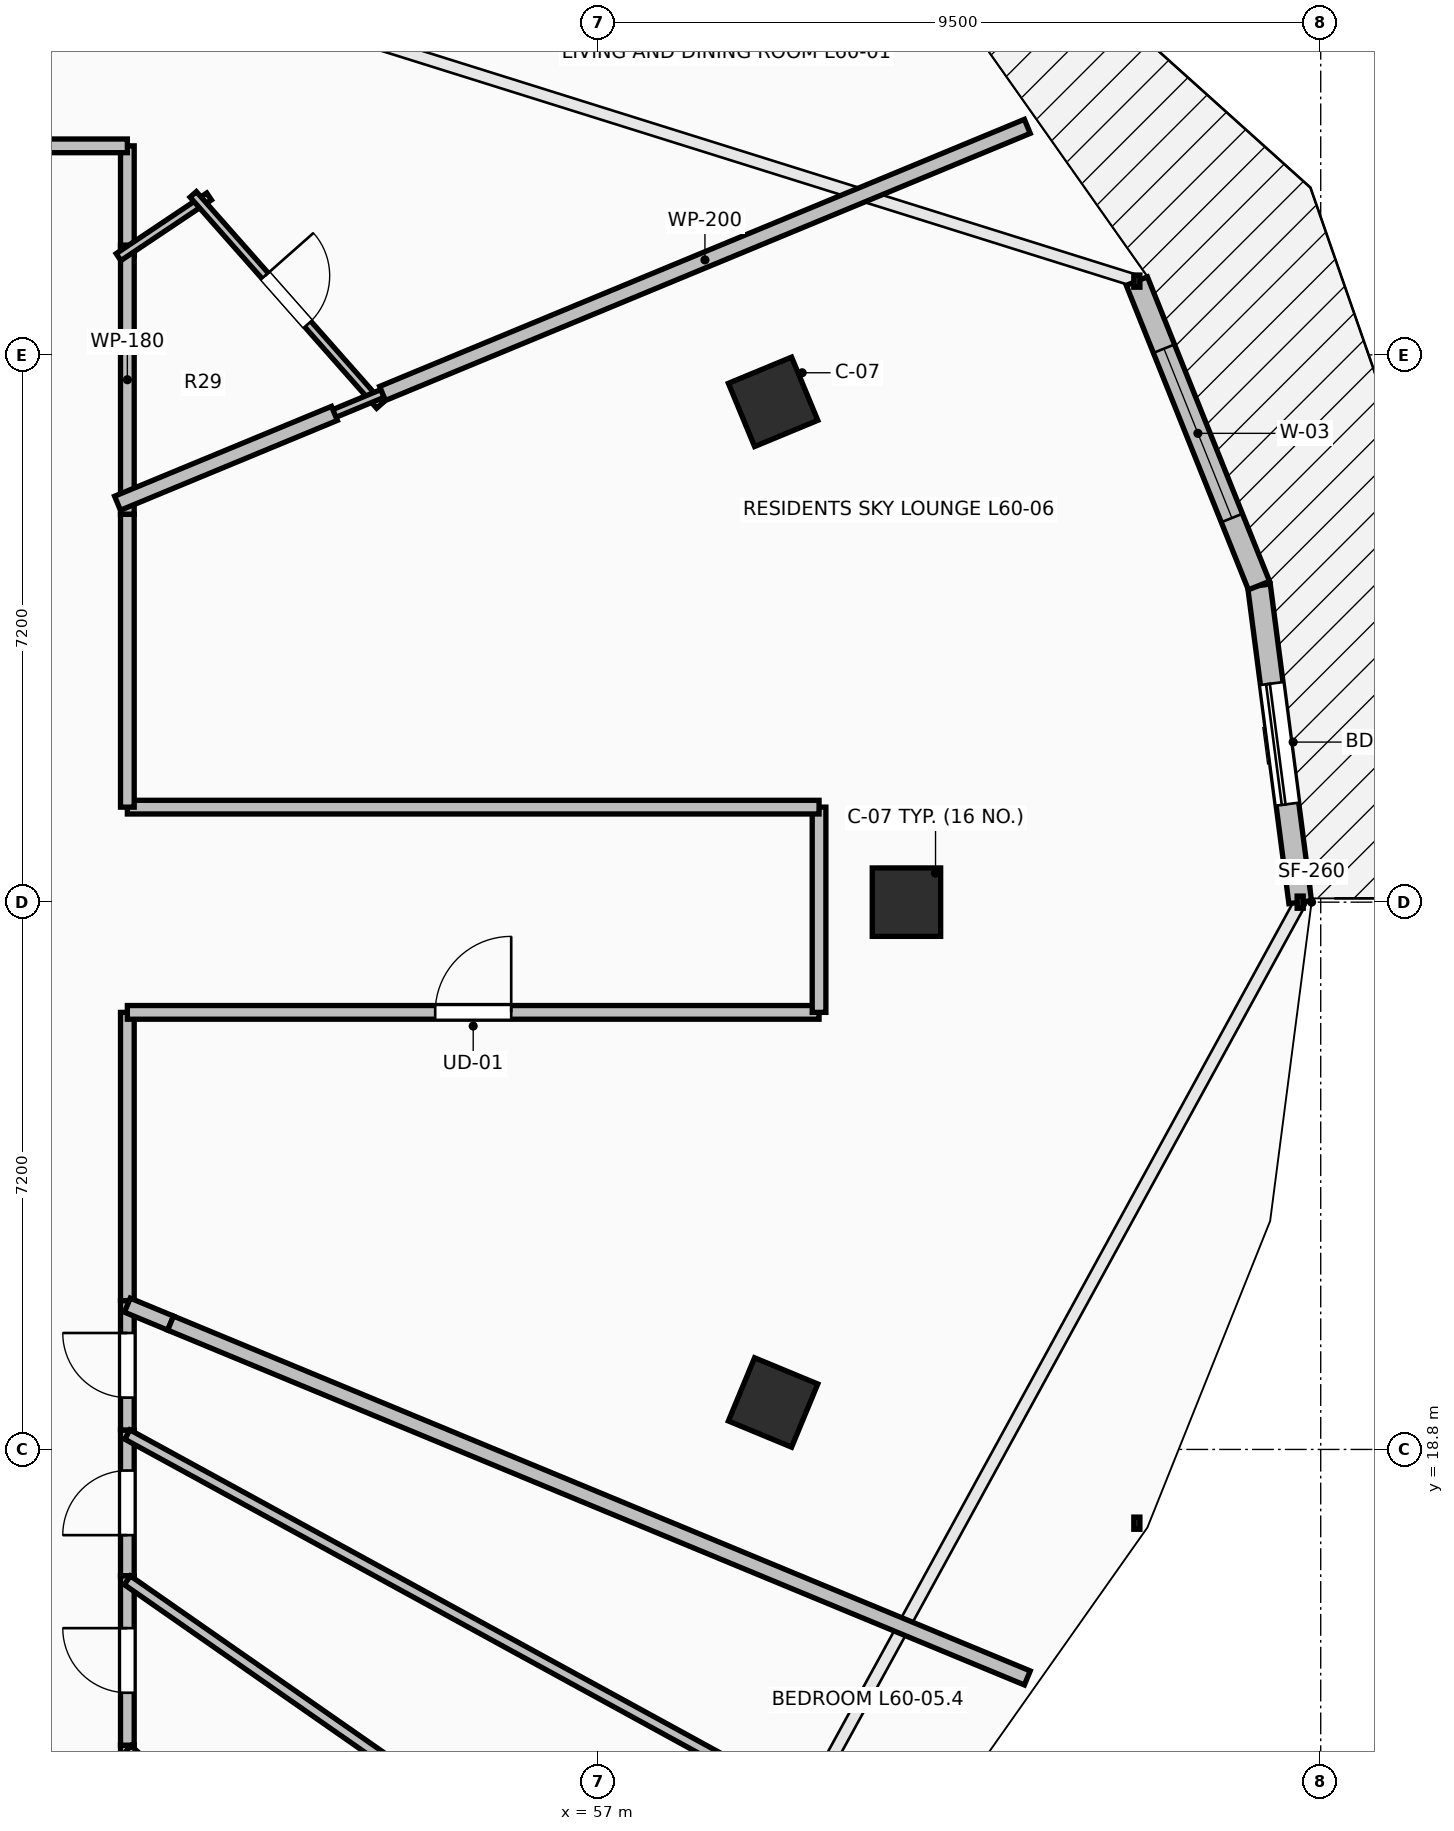
"""IFC4 building model, lengths in metres.
Left out: names, types, materials, properties, quantities, classifications, styles, units other than length and angle.
Written with IfcOpenShell. Run it as: python <this file> out.ifc"""

import sys

from ifc_helpers import new_model, si_unit, direction, frame, frame_2d, origin, origin_2d, place, context, subcontext, project, spatial, rectangle, extrude, element, fill, save


model = new_model("IFC4")
c1 = context("Model", 3, precision=1e-05, world=origin(), true_north=direction((0.0, 1.0)))
c2 = subcontext(c1, "Body", "Model", "MODEL_VIEW")
j1 = project(units=[si_unit("LENGTHUNIT", "METRE"), si_unit("PLANEANGLEUNIT", "RADIAN")], contexts=[c1])
p1 = place(None, origin())
s1 = spatial("IfcSite", under=j1, at=p1, CompositionType="ELEMENT")
p2 = place(p1, origin())
s2 = spatial("IfcBuilding", under=s1, at=p2, CompositionType="ELEMENT")
p3 = place(p2, frame((0.0, 0.0, 221.4)))
s3 = spatial("IfcBuildingStorey", under=s2, at=p3, CompositionType="ELEMENT", Elevation=221.4)
for number, where, z_axis, x_axis in (
    (1, (61.05, 26.0, 0.0), (0.0, 0.0, 1.0), (1.0, 0.0, 0.0)),
    (2, (59.295, 32.582, 0.0), (0.0, 0.0, 1.0), (0.924, 0.383, 0.0)),
    (3, (59.295, 19.418, 0.0), (0.0, 0.0, 1.0), (0.924, -0.383, 0.0)),
):
    element("IfcColumn", number, at=place(p3, frame(where, z_axis=z_axis, x_axis=x_axis)), inside=s3, PredefinedType="COLUMN", context=c2, shape_type="SweptSolid", body=[
        extrude(rectangle(XDim=0.9, YDim=0.9, at=origin_2d()), origin(), (0.0, 0.0, 1.0), 3.55),
    ])
p4 = place(p3, frame((66.23, 26.0, 0.0), z_axis=(0.0, 0.0, 1.0), x_axis=(-0.129147853268, 0.991625348605, 0.0)))
e4 = element("IfcWall", 4, at=p4, inside=s3, PredefinedType="STANDARD", context=c2, shape_type="SweptSolid", body=[
    extrude(rectangle(XDim=4.2, YDim=0.3, at=frame_2d((2.1, 0.0))), origin(), (0.0, 0.0, 1.0), 3.2),
])
p5 = place(p4, frame((1.3, 0.0, 0.0)))
e5 = element("IfcOpeningElement", 5, at=p5, cuts=e4, PredefinedType="OPENING", context=c2, shape_type="SweptSolid", body=[
    extrude(rectangle(XDim=1.6, YDim=2.3, at=frame_2d((0.8, 1.15))), frame((0.0, 0.165, 0.0), z_axis=(0.0, -1.0, 0.0), x_axis=(1.0, 0.0, 0.0)), (0.0, 0.0, 1.0), 0.33),
])
p6 = place(p3, frame((65.688, 30.165, 0.0), z_axis=(0.0, 0.0, 1.0), x_axis=(-0.372268409848, 0.928125116043, 0.0)))
e6 = element("IfcWall", 6, at=p6, inside=s3, PredefinedType="STANDARD", context=c2, shape_type="SweptSolid", body=[
    extrude(rectangle(XDim=4.315, YDim=0.3, at=frame_2d((2.158, 0.0))), origin(), (0.0, 0.0, 1.0), 3.2),
])
p7 = place(p6, frame((0.958, 0.0, 0.85)))
e7 = element("IfcOpeningElement", 7, at=p7, cuts=e6, PredefinedType="OPENING", context=c2, shape_type="SweptSolid", body=[
    extrude(rectangle(XDim=2.4, YDim=2.15, at=frame_2d((1.2, 1.075))), frame((0.0, 0.165, 0.0), z_axis=(0.0, -1.0, 0.0), x_axis=(1.0, 0.0, 0.0)), (0.0, 0.0, 1.0), 0.33),
])
p8 = place(p3, frame((50.8, 34.504, 0.0), z_axis=(0.0, 0.0, 1.0), x_axis=(0.0, 1.0, 0.0)))
e8 = element("IfcWall", 8, at=p8, inside=s3, PredefinedType="PARTITIONING", context=c2, shape_type="SweptSolid", body=[
    extrude(rectangle(XDim=1.446, YDim=0.18, at=frame_2d((0.723, 0.0))), origin(), (0.0, 0.0, 1.0), 2.392),
])
p9 = place(p3, frame((50.8, 35.95, 0.0), z_axis=(0.0, 0.0, 1.0), x_axis=(-1.0, 0.0, 0.0)))
e9 = element("IfcWall", 9, at=p9, inside=s3, PredefinedType="PARTITIONING", context=c2, shape_type="SweptSolid", body=[
    extrude(rectangle(XDim=3.948, YDim=0.18, at=frame_2d((1.974, 0.0))), origin(), (0.0, 0.0, 1.0), 2.392),
])
p10 = place(p9, frame((1.474, 0.0, 0.0)))
e10 = element("IfcOpeningElement", 10, at=p10, cuts=e9, PredefinedType="OPENING", context=c2, shape_type="SweptSolid", body=[
    extrude(rectangle(XDim=1.0, YDim=2.15, at=frame_2d((0.5, 1.075))), frame((0.0, 0.105, 0.0), z_axis=(0.0, -1.0, 0.0), x_axis=(1.0, 0.0, 0.0)), (0.0, 0.0, 1.0), 0.21),
])
p11 = place(p3, frame((50.8, 31.102, 0.0), z_axis=(0.0, 0.0, 1.0), x_axis=(0.0, 1.0, 0.0)))
e11 = element("IfcWall", 11, at=p11, inside=s3, PredefinedType="PARTITIONING", context=c2, shape_type="SweptSolid", body=[
    extrude(rectangle(XDim=3.542, YDim=0.18, at=frame_2d((1.771, 0.0))), origin(), (0.0, 0.0, 1.0), 2.392),
])
p12 = place(p3, frame((50.8, 14.05, 0.0), z_axis=(0.0, 0.0, 1.0), x_axis=(0.0, 1.0, 0.0)))
e12 = element("IfcWall", 12, at=p12, inside=s3, PredefinedType="PARTITIONING", context=c2, shape_type="SweptSolid", body=[
    extrude(rectangle(XDim=0.859, YDim=0.18, at=frame_2d((0.429, 0.0))), origin(), (0.0, 0.0, 1.0), 2.889),
])
p13 = place(p3, frame((50.8, 14.909, 0.0), z_axis=(0.0, 0.0, 1.0), x_axis=(0.0, 1.0, 0.0)))
e13 = element("IfcWall", 13, at=p13, inside=s3, PredefinedType="PARTITIONING", context=c2, shape_type="SweptSolid", body=[
    extrude(rectangle(XDim=2.23, YDim=0.18, at=frame_2d((1.115, 0.0))), origin(), (0.0, 0.0, 1.0), 2.392),
])
p14 = place(p13, frame((0.69, 0.0, 0.0)))
e14 = element("IfcOpeningElement", 14, at=p14, cuts=e13, PredefinedType="OPENING", context=c2, shape_type="SweptSolid", body=[
    extrude(rectangle(XDim=0.85, YDim=2.1, at=frame_2d((0.425, 1.05))), frame((0.0, 0.105, 0.0), z_axis=(0.0, -1.0, 0.0), x_axis=(1.0, 0.0, 0.0)), (0.0, 0.0, 1.0), 0.21),
])
p15 = place(p3, frame((50.8, 17.139, 0.0), z_axis=(0.0, 0.0, 1.0), x_axis=(0.0, 1.0, 0.0)))
e15 = element("IfcWall", 15, at=p15, inside=s3, PredefinedType="PARTITIONING", context=c2, shape_type="SweptSolid", body=[
    extrude(rectangle(XDim=1.917, YDim=0.18, at=frame_2d((0.958, 0.0))), origin(), (0.0, 0.0, 1.0), 3.2),
])
p16 = place(p15, frame((0.533, 0.0, 0.0)))
e16 = element("IfcOpeningElement", 16, at=p16, cuts=e15, PredefinedType="OPENING", context=c2, shape_type="SweptSolid", body=[
    extrude(rectangle(XDim=0.85, YDim=2.1, at=frame_2d((0.425, 1.05))), frame((0.0, 0.105, 0.0), z_axis=(0.0, -1.0, 0.0), x_axis=(1.0, 0.0, 0.0)), (0.0, 0.0, 1.0), 0.21),
])
p17 = place(p3, frame((50.8, 19.056, 0.0), z_axis=(0.0, 0.0, 1.0), x_axis=(0.0, 1.0, 0.0)))
e17 = element("IfcWall", 17, at=p17, inside=s3, PredefinedType="PARTITIONING", context=c2, shape_type="SweptSolid", body=[
    extrude(rectangle(XDim=1.702, YDim=0.18, at=frame_2d((0.851, 0.0))), origin(), (0.0, 0.0, 1.0), 3.2),
])
p18 = place(p17, frame((0.426, 0.0, 0.0)))
e18 = element("IfcOpeningElement", 18, at=p18, cuts=e17, PredefinedType="OPENING", context=c2, shape_type="SweptSolid", body=[
    extrude(rectangle(XDim=0.85, YDim=2.1, at=frame_2d((0.425, 1.05))), frame((0.0, 0.105, 0.0), z_axis=(0.0, -1.0, 0.0), x_axis=(1.0, 0.0, 0.0)), (0.0, 0.0, 1.0), 0.21),
])
p19 = place(p3, frame((50.8, 20.758, 0.0), z_axis=(0.0, 0.0, 1.0), x_axis=(0.0, 1.0, 0.0)))
e19 = element("IfcWall", 19, at=p19, inside=s3, PredefinedType="PARTITIONING", context=c2, shape_type="SweptSolid", body=[
    extrude(rectangle(XDim=3.792, YDim=0.18, at=frame_2d((1.896, 0.0))), origin(), (0.0, 0.0, 1.0), 3.2),
])
p20 = place(p3, frame((50.8, 24.55, 0.0), z_axis=(0.0, 0.0, 1.0), x_axis=(1.0, 0.0, 0.0)))
e20 = element("IfcWall", 20, at=p20, inside=s3, PredefinedType="PARTITIONING", context=c2, shape_type="SweptSolid", body=[
    extrude(rectangle(XDim=9.1, YDim=0.18, at=frame_2d((4.55, 0.0))), origin(), (0.0, 0.0, 1.0), 2.392),
])
p21 = place(p20, frame((4.05, 0.0, 0.0)))
e21 = element("IfcOpeningElement", 21, at=p21, cuts=e20, PredefinedType="OPENING", context=c2, shape_type="SweptSolid", body=[
    extrude(rectangle(XDim=1.0, YDim=2.15, at=frame_2d((0.5, 1.075))), frame((0.0, 0.105, 0.0), z_axis=(0.0, -1.0, 0.0), x_axis=(1.0, 0.0, 0.0)), (0.0, 0.0, 1.0), 0.21),
])
p22 = place(p3, frame((59.9, 24.55, 0.0), z_axis=(0.0, 0.0, 1.0), x_axis=(0.0, 1.0, 0.0)))
e22 = element("IfcWall", 22, at=p22, inside=s3, PredefinedType="PARTITIONING", context=c2, shape_type="SweptSolid", body=[
    extrude(rectangle(XDim=2.7, YDim=0.18, at=frame_2d((1.35, 0.0))), origin(), (0.0, 0.0, 1.0), 2.392),
])
p23 = place(p3, frame((59.9, 27.25, 0.0), z_axis=(0.0, 0.0, 1.0), x_axis=(-1.0, 0.0, 0.0)))
e23 = element("IfcWall", 23, at=p23, inside=s3, PredefinedType="PARTITIONING", context=c2, shape_type="SweptSolid", body=[
    extrude(rectangle(XDim=9.1, YDim=0.18, at=frame_2d((4.55, 0.0))), origin(), (0.0, 0.0, 1.0), 2.392),
])
p24 = place(p3, frame((50.8, 27.25, 0.0), z_axis=(0.0, 0.0, 1.0), x_axis=(0.0, 1.0, 0.0)))
e24 = element("IfcWall", 24, at=p24, inside=s3, PredefinedType="PARTITIONING", context=c2, shape_type="SweptSolid", body=[
    extrude(rectangle(XDim=3.852, YDim=0.18, at=frame_2d((1.926, 0.0))), origin(), (0.0, 0.0, 1.0), 2.392),
])
p25 = place(p3, frame((50.684, 34.486, 0.0), z_axis=(0.0, 0.0, 1.0), x_axis=(0.830948636418, 0.556349138253, 0.0)))
e25 = element("IfcWall", 25, at=p25, inside=s3, PredefinedType="PARTITIONING", context=c2, shape_type="SweptSolid", body=[
    extrude(rectangle(XDim=1.434, YDim=0.11, at=frame_2d((0.717, 0.0))), origin(), (0.0, 0.0, 1.0), 2.834),
])
p26 = place(p3, frame((51.666, 35.311, 0.0), z_axis=(0.0, 0.0, 1.0), x_axis=(0.662288118602, -0.749249256228, 0.0)))
e26 = element("IfcWall", 26, at=p26, inside=s3, PredefinedType="PARTITIONING", context=c2, shape_type="SweptSolid", body=[
    extrude(rectangle(XDim=3.706, YDim=0.11, at=frame_2d((1.853, 0.0))), origin(), (0.0, 0.0, 1.0), 2.392),
])
p27 = place(p26, frame((1.428, 0.0, 0.0)))
e27 = element("IfcOpeningElement", 27, at=p27, cuts=e26, PredefinedType="OPENING", context=c2, shape_type="SweptSolid", body=[
    extrude(rectangle(XDim=0.85, YDim=2.1, at=frame_2d((0.425, 1.05))), frame((0.0, 0.07, 0.0), z_axis=(0.0, -1.0, 0.0), x_axis=(1.0, 0.0, 0.0)), (0.0, 0.0, 1.0), 0.14),
])
p28 = place(p3, frame((54.157, 32.693, 0.0), z_axis=(0.0, 0.0, 1.0), x_axis=(-0.923731903457, -0.383039646166, 0.0)))
e28 = element("IfcWall", 28, at=p28, inside=s3, PredefinedType="PARTITIONING", context=c2, shape_type="SweptSolid", body=[
    extrude(rectangle(XDim=0.825, YDim=0.11, at=frame_2d((0.413, 0.0))), origin(), (0.0, 0.0, 1.0), 2.392),
])
p29 = place(p3, frame((52.34, 42.01, 0.0), z_axis=(0.0, 0.0, 1.0), x_axis=(-0.667173742476, -0.744902139445, 0.0)))
e29 = element("IfcWall", 29, at=p29, inside=s3, PredefinedType="PARTITIONING", context=c2, shape_type="SweptSolid", body=[
    extrude(rectangle(XDim=8.135, YDim=0.14, at=frame_2d((4.067, 0.0))), origin(), (0.0, 0.0, 1.0), 2.392),
])
p30 = place(p29, frame((3.617, 0.0, 0.0)))
e30 = element("IfcOpeningElement", 30, at=p30, cuts=e29, PredefinedType="OPENING", context=c2, shape_type="SweptSolid", body=[
    extrude(rectangle(XDim=0.9, YDim=2.1, at=frame_2d((0.45, 1.05))), frame((0.0, 0.085, 0.0), z_axis=(0.0, -1.0, 0.0), x_axis=(1.0, 0.0, 0.0)), (0.0, 0.0, 1.0), 0.17),
])
p31 = place(p3, frame((54.157, 32.692, 0.0), z_axis=(0.0, 0.0, 1.0), x_axis=(0.923874230192, 0.382696233045, 0.0)))
e31 = element("IfcWall", 31, at=p31, inside=s3, PredefinedType="PARTITIONING", context=c2, shape_type="SweptSolid", body=[
    extrude(rectangle(XDim=9.181, YDim=0.2, at=frame_2d((4.591, 0.0))), origin(), (0.0, 0.0, 1.0), 2.392),
])
p32 = place(p3, frame((50.671, 31.248, 0.0), z_axis=(0.0, 0.0, 1.0), x_axis=(0.923905073908, 0.382621764158, 0.0)))
e32 = element("IfcWall", 32, at=p32, inside=s3, PredefinedType="PARTITIONING", context=c2, shape_type="SweptSolid", body=[
    extrude(rectangle(XDim=3.088, YDim=0.2, at=frame_2d((1.544, 0.0))), origin(), (0.0, 0.0, 1.0), 2.834),
])
p33 = place(p3, frame((51.099, 44.795, 0.0), z_axis=(0.0, 0.0, 1.0), x_axis=(-0.571754326018, -0.82042488424, 0.0)))
e33 = element("IfcWall", 33, at=p33, inside=s3, PredefinedType="PARTITIONING", context=c2, shape_type="SweptSolid", body=[
    extrude(rectangle(XDim=10.781, YDim=0.14, at=frame_2d((5.391, 0.0))), origin(), (0.0, 0.0, 1.0), 2.392),
])
p34 = place(p3, frame((56.422, 9.951, 0.0), z_axis=(0.0, 0.0, 1.0), x_axis=(-0.753978537067, 0.656899052856, 0.0)))
e34 = element("IfcWall", 34, at=p34, inside=s3, PredefinedType="PARTITIONING", context=c2, shape_type="SweptSolid", body=[
    extrude(rectangle(XDim=7.457, YDim=0.14, at=frame_2d((3.728, 0.0))), origin(), (0.0, 0.0, 1.0), 2.734),
])
p35 = place(p3, frame((58.692, 11.578, 0.0), z_axis=(0.0, 0.0, 1.0), x_axis=(-0.820357038452, 0.571851667361, 0.0)))
e35 = element("IfcWall", 35, at=p35, inside=s3, PredefinedType="PARTITIONING", context=c2, shape_type="SweptSolid", body=[
    extrude(rectangle(XDim=9.62, YDim=0.14, at=frame_2d((4.81, 0.0))), origin(), (0.0, 0.0, 1.0), 2.734),
])
p36 = place(p3, frame((60.8, 13.524, 0.0), z_axis=(0.0, 0.0, 1.0), x_axis=(-0.877244884683, 0.480043135871, 0.0)))
e36 = element("IfcWall", 36, at=p36, inside=s3, PredefinedType="PARTITIONING", context=c2, shape_type="SweptSolid", body=[
    extrude(rectangle(XDim=11.399, YDim=0.14, at=frame_2d((5.7, 0.0))), origin(), (0.0, 0.0, 1.0), 2.734),
])
p37 = place(p3, frame((51.369, 20.462, 0.0), z_axis=(0.0, 0.0, 1.0), x_axis=(-0.923615496363, 0.383320251066, 0.0)))
e37 = element("IfcWall", 37, at=p37, inside=s3, PredefinedType="PARTITIONING", context=c2, shape_type="SweptSolid", body=[
    extrude(rectangle(XDim=0.616, YDim=0.2, at=frame_2d((0.308, 0.0))), origin(), (0.0, 0.0, 1.0), 3.2),
])
p38 = place(p3, frame((62.64, 15.794, 0.0), z_axis=(0.0, 0.0, 1.0), x_axis=(-0.923897809723, 0.382639304291, 0.0)))
e38 = element("IfcWall", 38, at=p38, inside=s3, PredefinedType="PARTITIONING", context=c2, shape_type="SweptSolid", body=[
    extrude(rectangle(XDim=12.199, YDim=0.2, at=frame_2d((6.1, 0.0))), origin(), (0.0, 0.0, 1.0), 2.734),
])
p39 = place(p5, origin())
e39 = element("IfcDoor", 39, at=p39, inside=s3, OperationType="SLIDING_TO_LEFT", PredefinedType="DOOR", context=c2, shape_type="SweptSolid", body=[
    extrude(rectangle(XDim=1.6, YDim=2.3, at=frame_2d((0.8, 1.15))), frame((0.0, 0.025, 0.0), z_axis=(0.0, -1.0, 0.0), x_axis=(1.0, 0.0, 0.0)), (0.0, 0.0, 1.0), 0.05),
])
fill(e5, e39)
p40 = place(p7, origin())
e40 = element("IfcWindow", 40, at=p40, inside=s3, PartitioningType="SINGLE_PANEL", PredefinedType="WINDOW", context=c2, shape_type="SweptSolid", body=[
    extrude(rectangle(XDim=2.4, YDim=2.15, at=frame_2d((1.2, 1.075))), frame((0.0, 0.03, 0.0), z_axis=(0.0, -1.0, 0.0), x_axis=(1.0, 0.0, 0.0)), (0.0, 0.0, 1.0), 0.06),
])
fill(e7, e40)
p41 = place(p21, origin())
e41 = element("IfcDoor", 41, at=p41, inside=s3, OperationType="SINGLE_SWING_RIGHT", PredefinedType="DOOR", context=c2, shape_type="SweptSolid", body=[
    extrude(rectangle(XDim=1.0, YDim=2.15, at=frame_2d((0.5, 1.075))), frame((0.0, 0.025, 0.0), z_axis=(0.0, -1.0, 0.0), x_axis=(1.0, 0.0, 0.0)), (0.0, 0.0, 1.0), 0.05),
])
fill(e21, e41)
p42 = place(p27, origin())
e42 = element("IfcDoor", 42, at=p42, inside=s3, OperationType="SINGLE_SWING_LEFT", PredefinedType="DOOR", context=c2, shape_type="SweptSolid", body=[
    extrude(rectangle(XDim=0.85, YDim=2.1, at=frame_2d((0.425, 1.05))), frame((0.0, 0.025, 0.0), z_axis=(0.0, -1.0, 0.0), x_axis=(1.0, 0.0, 0.0)), (0.0, 0.0, 1.0), 0.05),
])
fill(e27, e42)
p43 = place(p14, origin())
e43 = element("IfcDoor", 43, at=p43, inside=s3, OperationType="SINGLE_SWING_RIGHT", PredefinedType="DOOR", context=c2, shape_type="SweptSolid", body=[
    extrude(rectangle(XDim=0.85, YDim=2.1, at=frame_2d((0.425, 1.05))), frame((0.0, 0.025, 0.0), z_axis=(0.0, -1.0, 0.0), x_axis=(1.0, 0.0, 0.0)), (0.0, 0.0, 1.0), 0.05),
])
fill(e14, e43)
p44 = place(p16, origin())
e44 = element("IfcDoor", 44, at=p44, inside=s3, OperationType="SINGLE_SWING_LEFT", PredefinedType="DOOR", context=c2, shape_type="SweptSolid", body=[
    extrude(rectangle(XDim=0.85, YDim=2.1, at=frame_2d((0.425, 1.05))), frame((0.0, 0.025, 0.0), z_axis=(0.0, -1.0, 0.0), x_axis=(1.0, 0.0, 0.0)), (0.0, 0.0, 1.0), 0.05),
])
fill(e16, e44)
p45 = place(p18, origin())
e45 = element("IfcDoor", 45, at=p45, inside=s3, OperationType="SINGLE_SWING_RIGHT", PredefinedType="DOOR", context=c2, shape_type="SweptSolid", body=[
    extrude(rectangle(XDim=0.85, YDim=2.1, at=frame_2d((0.425, 1.05))), frame((0.0, 0.025, 0.0), z_axis=(0.0, -1.0, 0.0), x_axis=(1.0, 0.0, 0.0)), (0.0, 0.0, 1.0), 0.05),
])
fill(e18, e45)
save(model, sys.argv[1])
